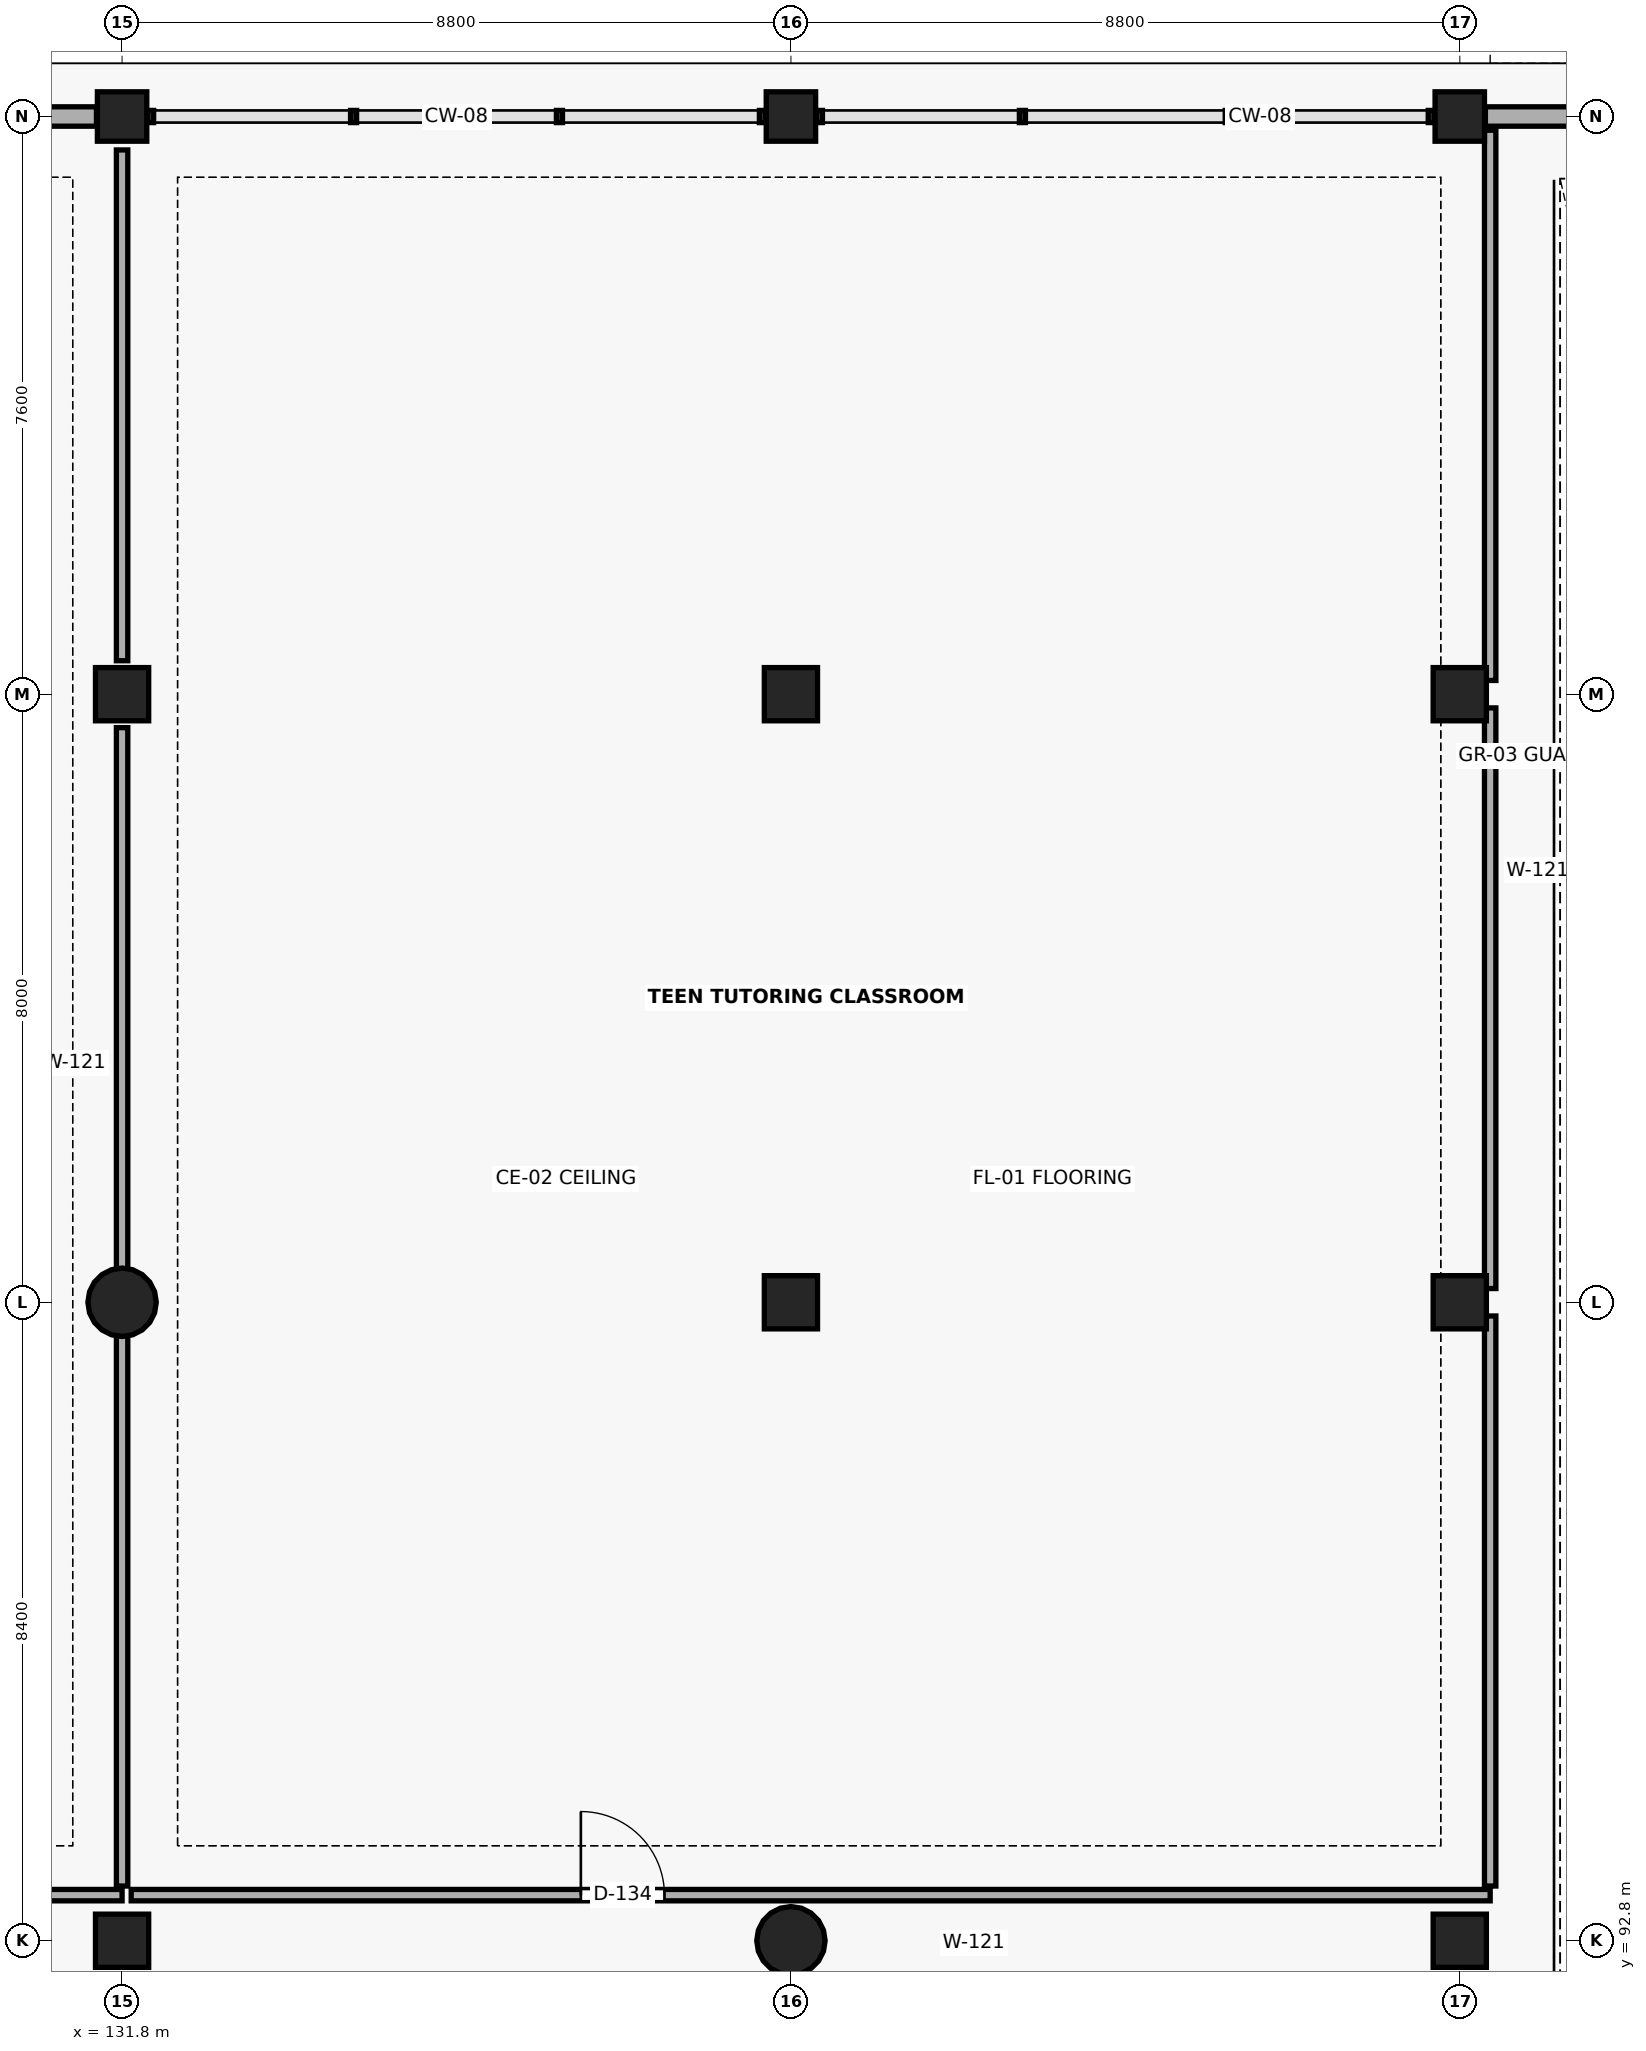
"""IFC4 building model, lengths in metres.
Left out: names, types, materials, properties, quantities, classifications, styles, units other than length and angle.
Written with IfcOpenShell. Run it as: python <this file> out.ifc"""

import sys

from ifc_helpers import new_model, si_unit, direction, frame, frame_2d, origin, origin_2d, place, context, subcontext, project, spatial, rectangle, circle, extrude, element, fill, save


model = new_model("IFC4")
c1 = context("Model", 3, precision=1e-05, world=origin(), true_north=direction((0.0, 1.0)))
c2 = subcontext(c1, "Body", "Model", "MODEL_VIEW")
j1 = project(units=[si_unit("LENGTHUNIT", "METRE"), si_unit("PLANEANGLEUNIT", "RADIAN")], contexts=[c1])
p1 = place(None, origin())
s1 = spatial("IfcSite", under=j1, at=p1, CompositionType="ELEMENT")
p2 = place(p1, origin())
s2 = spatial("IfcBuilding", under=s1, at=p2, CompositionType="ELEMENT")
p3 = place(p2, origin())
s3 = spatial("IfcBuildingStorey", under=s2, at=p3, CompositionType="ELEMENT", Elevation=0.0)
p4 = place(p3, frame((131.8, 92.8, 0.0), z_axis=(0.0, 0.0, 1.0), x_axis=(1.0, 0.0, 0.0)))
e1 = element("IfcColumn", 1, at=p4, inside=s3, PredefinedType="COLUMN", context=c2, shape_type="SweptSolid", body=[
    extrude(rectangle(XDim=0.7, YDim=0.7, at=origin_2d()), origin(), (0.0, 0.0, 1.0), 5.1),
])
p5 = place(p3, frame((131.8, 101.2, 0.0), z_axis=(0.0, 0.0, 1.0), x_axis=(1.0, 0.0, 0.0)))
e2 = element("IfcColumn", 2, at=p5, inside=s3, PredefinedType="COLUMN", context=c2, shape_type="SweptSolid", body=[
    extrude(circle(Radius=0.45, at=origin_2d()), origin(), (0.0, 0.0, 1.0), 5.1),
])
p6 = place(p3, frame((131.8, 109.2, 0.0), z_axis=(0.0, 0.0, 1.0), x_axis=(1.0, 0.0, 0.0)))
e3 = element("IfcColumn", 3, at=p6, inside=s3, PredefinedType="COLUMN", context=c2, shape_type="SweptSolid", body=[
    extrude(rectangle(XDim=0.7, YDim=0.7, at=origin_2d()), origin(), (0.0, 0.0, 1.0), 5.1),
])
p7 = place(p3, frame((131.8, 116.8, 0.0), z_axis=(0.0, 0.0, 1.0), x_axis=(1.0, 0.0, 0.0)))
e4 = element("IfcColumn", 4, at=p7, inside=s3, PredefinedType="COLUMN", context=c2, shape_type="SweptSolid", body=[
    extrude(rectangle(XDim=0.65, YDim=0.65, at=origin_2d()), origin(), (0.0, 0.0, 1.0), 5.1),
])
p8 = place(p3, frame((140.6, 92.8, 0.0), z_axis=(0.0, 0.0, 1.0), x_axis=(1.0, 0.0, 0.0)))
e5 = element("IfcColumn", 5, at=p8, inside=s3, PredefinedType="COLUMN", context=c2, shape_type="SweptSolid", body=[
    extrude(circle(Radius=0.45, at=origin_2d()), origin(), (0.0, 0.0, 1.0), 5.1),
])
for number, where, z_axis, x_axis in (
    (6, (140.6, 101.2, 0.0), (0.0, 0.0, 1.0), (1.0, 0.0, 0.0)),
    (7, (140.6, 109.2, 0.0), (0.0, 0.0, 1.0), (1.0, 0.0, 0.0)),
):
    element("IfcColumn", number, at=place(p3, frame(where, z_axis=z_axis, x_axis=x_axis)), inside=s3, PredefinedType="COLUMN", context=c2, shape_type="SweptSolid", body=[
        extrude(rectangle(XDim=0.7, YDim=0.7, at=origin_2d()), origin(), (0.0, 0.0, 1.0), 5.1),
    ])
p9 = place(p3, frame((140.6, 116.8, 0.0), z_axis=(0.0, 0.0, 1.0), x_axis=(1.0, 0.0, 0.0)))
e8 = element("IfcColumn", 8, at=p9, inside=s3, PredefinedType="COLUMN", context=c2, shape_type="SweptSolid", body=[
    extrude(rectangle(XDim=0.65, YDim=0.65, at=origin_2d()), origin(), (0.0, 0.0, 1.0), 5.1),
])
for number, where, z_axis, x_axis in (
    (9, (149.4, 92.8, 0.0), (0.0, 0.0, 1.0), (1.0, 0.0, 0.0)),
    (10, (149.4, 101.2, 0.0), (0.0, 0.0, 1.0), (1.0, 0.0, 0.0)),
    (11, (149.4, 109.2, 0.0), (0.0, 0.0, 1.0), (1.0, 0.0, 0.0)),
):
    element("IfcColumn", number, at=place(p3, frame(where, z_axis=z_axis, x_axis=x_axis)), inside=s3, PredefinedType="COLUMN", context=c2, shape_type="SweptSolid", body=[
        extrude(rectangle(XDim=0.7, YDim=0.7, at=origin_2d()), origin(), (0.0, 0.0, 1.0), 5.1),
    ])
p10 = place(p3, frame((149.4, 116.8, 0.0), z_axis=(0.0, 0.0, 1.0), x_axis=(1.0, 0.0, 0.0)))
e12 = element("IfcColumn", 12, at=p10, inside=s3, PredefinedType="COLUMN", context=c2, shape_type="SweptSolid", body=[
    extrude(rectangle(XDim=0.65, YDim=0.65, at=origin_2d()), origin(), (0.0, 0.0, 1.0), 5.1),
])
p11 = place(p3, frame((123.337, 116.8, 0.0), z_axis=(0.0, 0.0, 1.0), x_axis=(1.0, 0.0, 0.0)))
e13 = element("IfcWall", 13, at=p11, inside=s3, PredefinedType="SOLIDWALL", context=c2, shape_type="SweptSolid", body=[
    extrude(rectangle(XDim=8.126, YDim=0.255, at=frame_2d((4.063, 0.0))), origin(), (0.0, 0.0, 1.0), 3.94),
])
p12 = place(p11, frame((3.063, 0.0, 0.0)))
e14 = element("IfcOpeningElement", 14, at=p12, cuts=e13, PredefinedType="OPENING", context=c2, shape_type="SweptSolid", body=[
    extrude(rectangle(XDim=2.0, YDim=2.45, at=frame_2d((1.0, 1.225))), frame((0.0, 0.139, 0.0), z_axis=(0.0, -1.0, 0.0), x_axis=(1.0, 0.0, 0.0)), (0.0, 0.0, 1.0), 0.279),
])
p13 = place(p3, frame((149.737, 116.8, 0.0), z_axis=(0.0, 0.0, 1.0), x_axis=(1.0, 0.0, 0.0)))
e15 = element("IfcWall", 15, at=p13, inside=s3, PredefinedType="SOLIDWALL", context=c2, shape_type="SweptSolid", body=[
    extrude(rectangle(XDim=8.126, YDim=0.255, at=frame_2d((4.063, 0.0))), origin(), (0.0, 0.0, 1.0), 3.94),
])
p14 = place(p13, frame((1.263, 0.0, 0.0)))
e16 = element("IfcOpeningElement", 16, at=p14, cuts=e15, PredefinedType="OPENING", context=c2, shape_type="SweptSolid", body=[
    extrude(rectangle(XDim=5.6, YDim=3.3, at=frame_2d((2.8, 1.65))), frame((0.0, 0.139, 0.0), z_axis=(0.0, -1.0, 0.0), x_axis=(1.0, 0.0, 0.0)), (0.0, 0.0, 1.0), 0.279),
])
p15 = place(p3, frame((105.2, 93.4, 0.0), z_axis=(0.0, 0.0, 1.0), x_axis=(1.0, 0.0, 0.0)))
e17 = element("IfcWall", 17, at=p15, inside=s3, PredefinedType="PARTITIONING", context=c2, shape_type="SweptSolid", body=[
    extrude(rectangle(XDim=26.6, YDim=0.15, at=frame_2d((13.3, 0.0))), origin(), (0.0, 0.0, 1.0), 4.8),
])
p16 = place(p15, frame((10.409, 0.0, 0.0)))
e18 = element("IfcOpeningElement", 18, at=p16, cuts=e17, PredefinedType="OPENING", context=c2, shape_type="SweptSolid", body=[
    extrude(rectangle(XDim=1.4, YDim=2.3, at=frame_2d((0.7, 1.15))), frame((0.0, 0.087, 0.0), z_axis=(0.0, -1.0, 0.0), x_axis=(1.0, 0.0, 0.0)), (0.0, 0.0, 1.0), 0.174),
])
p17 = place(p3, frame((131.8, 93.52, 0.0), z_axis=(0.0, 0.0, 1.0), x_axis=(0.0, 1.0, 0.0)))
e19 = element("IfcWall", 19, at=p17, inside=s3, PredefinedType="PARTITIONING", context=c2, shape_type="SweptSolid", body=[
    extrude(rectangle(XDim=7.24, YDim=0.15, at=frame_2d((3.62, 0.0))), origin(), (0.0, 0.0, 1.0), 4.1),
])
p18 = place(p3, frame((131.8, 101.64, 0.0), z_axis=(0.0, 0.0, 1.0), x_axis=(0.0, 1.0, 0.0)))
e20 = element("IfcWall", 20, at=p18, inside=s3, PredefinedType="PARTITIONING", context=c2, shape_type="SweptSolid", body=[
    extrude(rectangle(XDim=7.12, YDim=0.15, at=frame_2d((3.56, 0.0))), origin(), (0.0, 0.0, 1.0), 4.1),
])
p19 = place(p3, frame((131.8, 109.64, 0.0), z_axis=(0.0, 0.0, 1.0), x_axis=(0.0, 1.0, 0.0)))
e21 = element("IfcWall", 21, at=p19, inside=s3, PredefinedType="PARTITIONING", context=c2, shape_type="SweptSolid", body=[
    extrude(rectangle(XDim=6.72, YDim=0.15, at=frame_2d((3.36, 0.0))), origin(), (0.0, 0.0, 1.0), 4.1),
])
p20 = place(p3, frame((131.92, 93.4, 0.0), z_axis=(0.0, 0.0, 1.0), x_axis=(1.0, 0.0, 0.0)))
e22 = element("IfcWall", 22, at=p20, inside=s3, PredefinedType="PARTITIONING", context=c2, shape_type="SweptSolid", body=[
    extrude(rectangle(XDim=17.88, YDim=0.15, at=frame_2d((8.94, 0.0))), origin(), (0.0, 0.0, 1.0), 4.8),
])
p21 = place(p20, frame((5.916, 0.0, 0.0)))
e23 = element("IfcOpeningElement", 23, at=p21, cuts=e22, PredefinedType="OPENING", context=c2, shape_type="SweptSolid", body=[
    extrude(rectangle(XDim=1.1, YDim=2.25, at=frame_2d((0.55, 1.125))), frame((0.0, 0.087, 0.0), z_axis=(0.0, -1.0, 0.0), x_axis=(1.0, 0.0, 0.0)), (0.0, 0.0, 1.0), 0.174),
])
p22 = place(p3, frame((149.8, 93.52, 0.0), z_axis=(0.0, 0.0, 1.0), x_axis=(0.0, 1.0, 0.0)))
e24 = element("IfcWall", 24, at=p22, inside=s3, PredefinedType="PARTITIONING", context=c2, shape_type="SweptSolid", body=[
    extrude(rectangle(XDim=7.5, YDim=0.15, at=frame_2d((3.75, 0.0))), origin(), (0.0, 0.0, 1.0), 4.8),
])
p23 = place(p3, frame((149.8, 101.381, 0.0), z_axis=(0.0, 0.0, 1.0), x_axis=(0.0, 1.0, 0.0)))
e25 = element("IfcWall", 25, at=p23, inside=s3, PredefinedType="PARTITIONING", context=c2, shape_type="SweptSolid", body=[
    extrude(rectangle(XDim=7.639, YDim=0.15, at=frame_2d((3.819, 0.0))), origin(), (0.0, 0.0, 1.0), 4.8),
])
p24 = place(p3, frame((149.8, 109.381, 0.0), z_axis=(0.0, 0.0, 1.0), x_axis=(0.0, 1.0, 0.0)))
e26 = element("IfcWall", 26, at=p24, inside=s3, PredefinedType="PARTITIONING", context=c2, shape_type="SweptSolid", body=[
    extrude(rectangle(XDim=7.239, YDim=0.15, at=frame_2d((3.619, 0.0))), origin(), (0.0, 0.0, 1.0), 4.8),
])
p25 = place(p21, origin())
e27 = element("IfcDoor", 27, at=p25, inside=s3, OperationType="SINGLE_SWING_LEFT", PredefinedType="DOOR", context=c2, shape_type="SweptSolid", body=[
    extrude(rectangle(XDim=1.1, YDim=2.25, at=frame_2d((0.55, 1.125))), frame((0.0, 0.025, 0.0), z_axis=(0.0, -1.0, 0.0), x_axis=(1.0, 0.0, 0.0)), (0.0, 0.0, 1.0), 0.05),
])
fill(e23, e27)
save(model, sys.argv[1])
